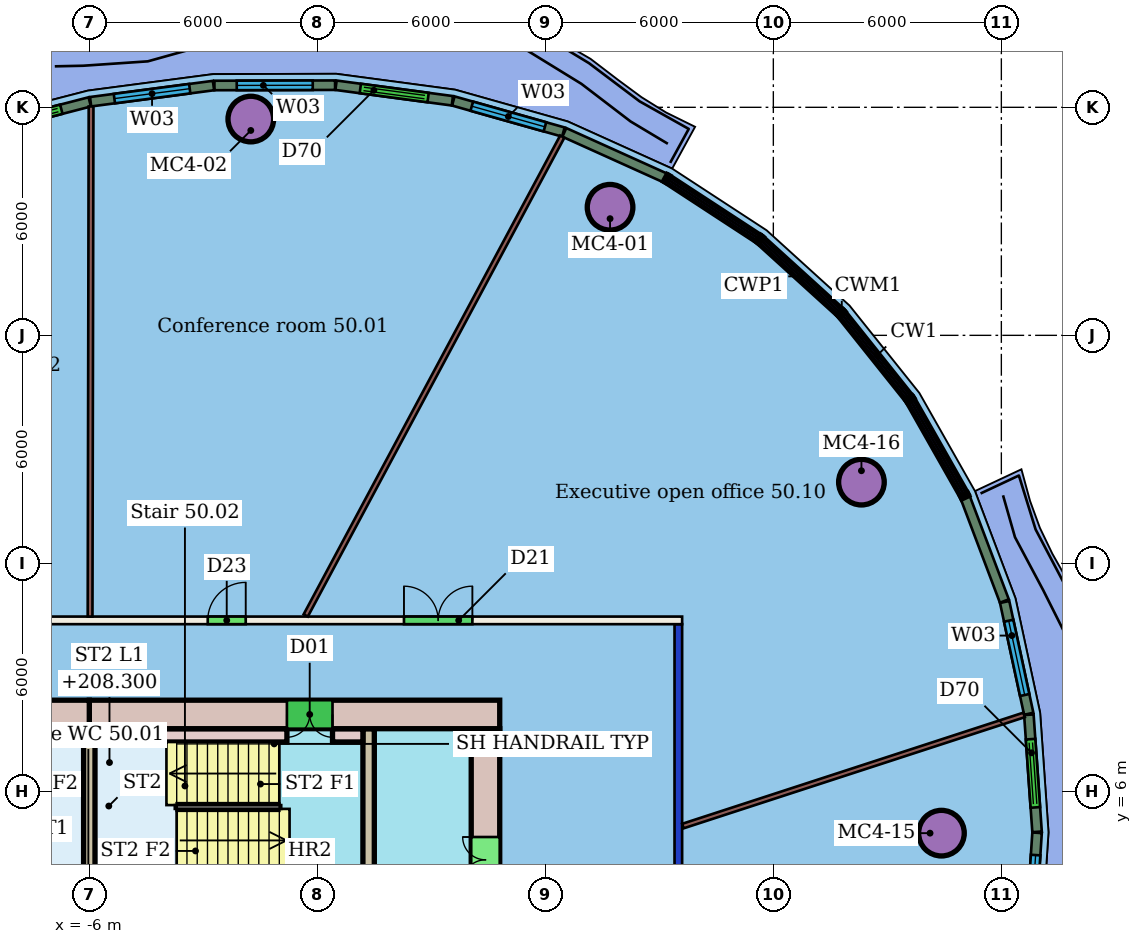
"""IFC4 building model, lengths in metres.
Left out: names, types, materials, properties, quantities, classifications, styles, units other than length and angle.
Written with IfcOpenShell. Run it as: python <this file> out.ifc"""

import sys

from ifc_helpers import new_model, si_unit, direction, frame, frame_2d, origin, origin_2d, place, context, subcontext, project, spatial, rectangle, hollow_circle, extrude, element, fill, save


model = new_model("IFC4")
c1 = context("Model", 3, precision=1e-05, world=origin(), true_north=direction((0.0, 1.0)))
c2 = subcontext(c1, "Body", "Model", "MODEL_VIEW")
j1 = project(units=[si_unit("LENGTHUNIT", "METRE"), si_unit("PLANEANGLEUNIT", "RADIAN")], contexts=[c1])
p1 = place(None, origin())
s1 = spatial("IfcSite", under=j1, at=p1, CompositionType="ELEMENT")
p2 = place(p1, origin())
s2 = spatial("IfcBuilding", under=s1, at=p2, CompositionType="ELEMENT")
p3 = place(p2, frame((0.0, 0.0, 206.5)))
s3 = spatial("IfcBuildingStorey", under=s2, at=p3, CompositionType="ELEMENT", Elevation=206.5)
for number, where, z_axis, x_axis in (
    (1, (7.704, 21.37, 0.0), (0.0, 0.0, 1.0), (1.0, 0.0, 0.0)),
    (2, (-1.75, 23.691, 0.0), (0.0, 0.0, 1.0), (1.0, 0.0, 0.0)),
    (3, (16.424, 4.901, 0.0), (0.0, 0.0, 1.0), (1.0, 0.0, 0.0)),
    (4, (14.318, 14.137, 0.0), (0.0, 0.0, 1.0), (1.0, 0.0, 0.0)),
):
    element("IfcColumn", number, at=place(p3, frame(where, z_axis=z_axis, x_axis=x_axis)), inside=s3, PredefinedType="COLUMN", context=c2, shape_type="SweptSolid", body=[
        extrude(hollow_circle(Radius=0.6, WallThickness=0.045, at=origin_2d()), origin(), (0.0, 0.0, 1.0), 3.45),
    ])
p4 = place(p3, frame((-21.6, 10.5, 0.0), z_axis=(0.0, 0.0, 1.0), x_axis=(1.0, 0.0, 0.0)))
e5 = element("IfcWall", 5, at=p4, inside=s3, PredefinedType="PARTITIONING", context=c2, shape_type="SweptSolid", body=[
    extrude(rectangle(XDim=31.2, YDim=0.2, at=frame_2d((15.6, 0.0))), origin(), (0.0, 0.0, 1.0), 3.45),
])
p5 = place(p4, frame((18.717, 0.0, 0.0)))
e6 = element("IfcOpeningElement", 6, at=p5, cuts=e5, PredefinedType="OPENING", context=c2, shape_type="SweptSolid", body=[
    extrude(rectangle(XDim=1.0, YDim=2.4, at=frame_2d((0.5, 1.2))), frame((0.0, 0.11, 0.0), z_axis=(0.0, -1.0, 0.0), x_axis=(1.0, 0.0, 0.0)), (0.0, 0.0, 1.0), 0.22),
])
p6 = place(p4, frame((12.014, 0.0, 0.0)))
e7 = element("IfcOpeningElement", 7, at=p6, cuts=e5, PredefinedType="OPENING", context=c2, shape_type="SweptSolid", body=[
    extrude(rectangle(XDim=1.0, YDim=2.4, at=frame_2d((0.5, 1.2))), frame((0.0, 0.11, 0.0), z_axis=(0.0, -1.0, 0.0), x_axis=(1.0, 0.0, 0.0)), (0.0, 0.0, 1.0), 0.22),
])
p7 = place(p4, frame((6.037, 0.0, 0.0)))
e8 = element("IfcOpeningElement", 8, at=p7, cuts=e5, PredefinedType="OPENING", context=c2, shape_type="SweptSolid", body=[
    extrude(rectangle(XDim=1.8, YDim=2.4, at=frame_2d((0.9, 1.2))), frame((0.0, 0.11, 0.0), z_axis=(0.0, -1.0, 0.0), x_axis=(1.0, 0.0, 0.0)), (0.0, 0.0, 1.0), 0.22),
])
p8 = place(p4, frame((23.88, 0.0, 0.0)))
e9 = element("IfcOpeningElement", 9, at=p8, cuts=e5, PredefinedType="OPENING", context=c2, shape_type="SweptSolid", body=[
    extrude(rectangle(XDim=1.8, YDim=2.1, at=frame_2d((0.9, 1.05))), frame((0.0, 0.11, 0.0), z_axis=(0.0, -1.0, 0.0), x_axis=(1.0, 0.0, 0.0)), (0.0, 0.0, 1.0), 0.22),
])
p9 = place(p3, frame((9.5, 10.4, 0.0), z_axis=(0.0, 0.0, 1.0), x_axis=(0.0, -1.0, 0.0)))
e10 = element("IfcWall", 10, at=p9, inside=s3, PredefinedType="PARTITIONING", context=c2, shape_type="SweptSolid", body=[
    extrude(rectangle(XDim=20.8, YDim=0.2, at=frame_2d((10.4, 0.0))), origin(), (0.0, 0.0, 1.0), 3.05),
])
p10 = place(p9, frame((8.246, 0.0, 0.0)))
e11 = element("IfcOpeningElement", 11, at=p10, cuts=e10, PredefinedType="OPENING", context=c2, shape_type="SweptSolid", body=[
    extrude(rectangle(XDim=1.5, YDim=2.1, at=frame_2d((0.75, 1.05))), frame((0.0, 0.11, 0.0), z_axis=(0.0, -1.0, 0.0), x_axis=(1.0, 0.0, 0.0)), (0.0, 0.0, 1.0), 0.22),
])
p11 = place(p3, frame((6.445, 23.228, 0.0), z_axis=(0.0, 0.0, 1.0), x_axis=(-0.472254118232, -0.881462448328, 0.0)))
e12 = element("IfcWall", 12, at=p11, inside=s3, PredefinedType="PARTITIONING", context=c2, shape_type="SweptSolid", body=[
    extrude(rectangle(XDim=14.293, YDim=0.125, at=frame_2d((7.146, 0.0))), origin(), (0.0, 0.0, 1.0), 3.45),
])
p12 = place(p3, frame((-5.953, 24.023, 0.0), z_axis=(0.0, 0.0, 1.0), x_axis=(-0.001946158555, -0.999998106232, 0.0)))
e13 = element("IfcWall", 13, at=p12, inside=s3, PredefinedType="PARTITIONING", context=c2, shape_type="SweptSolid", body=[
    extrude(rectangle(XDim=13.423, YDim=0.125, at=frame_2d((6.711, 0.0))), origin(), (0.0, 0.0, 1.0), 3.45),
])
p13 = place(p3, frame((18.599, 8.013, 0.0), z_axis=(0.0, 0.0, 1.0), x_axis=(-0.950829834715, -0.30971377983, 0.0)))
e14 = element("IfcWall", 14, at=p13, inside=s3, PredefinedType="PARTITIONING", context=c2, shape_type="SweptSolid", body=[
    extrude(rectangle(XDim=9.444, YDim=0.125, at=frame_2d((4.722, 0.0))), origin(), (0.0, 0.0, 1.0), 3.45),
])
p14 = place(p3, frame((9.144, 22.147, 0.0), z_axis=(0.0, 0.0, 1.0), x_axis=(-0.91141845893, 0.411480731897, 0.0)))
e15 = element("IfcWall", 15, at=p14, inside=s3, PredefinedType="SOLIDWALL", context=c2, shape_type="SweptSolid", body=[
    extrude(rectangle(XDim=2.901, YDim=0.25, at=frame_2d((1.45, 0.0))), origin(), (0.0, 0.0, 1.0), 3.1),
])
p15 = place(p3, frame((6.475, 23.349, 0.0), z_axis=(0.0, 0.0, 1.0), x_axis=(-0.962400743331, 0.271633593717, 0.0)))
e16 = element("IfcWall", 16, at=p15, inside=s3, PredefinedType="SOLIDWALL", context=c2, shape_type="SweptSolid", body=[
    extrude(rectangle(XDim=3.009, YDim=0.25, at=frame_2d((1.504, 0.0))), origin(), (0.0, 0.0, 1.0), 3.1),
])
p16 = place(p15, frame((0.504, 0.0, 0.9)))
e17 = element("IfcOpeningElement", 17, at=p16, cuts=e16, PredefinedType="OPENING", context=c2, shape_type="SweptSolid", body=[
    extrude(rectangle(XDim=2.0, YDim=2.1, at=frame_2d((1.0, 1.05))), frame((0.0, 0.135, 0.0), z_axis=(0.0, -1.0, 0.0), x_axis=(1.0, 0.0, 0.0)), (0.0, 0.0, 1.0), 0.27),
])
p17 = place(p3, frame((3.554, 24.172, 0.0), z_axis=(0.0, 0.0, 1.0), x_axis=(-0.99120717839, 0.132319044388, 0.0)))
e18 = element("IfcWall", 18, at=p17, inside=s3, PredefinedType="SOLIDWALL", context=c2, shape_type="SweptSolid", body=[
    extrude(rectangle(XDim=3.089, YDim=0.25, at=frame_2d((1.544, 0.0))), origin(), (0.0, 0.0, 1.0), 3.1),
])
p18 = place(p17, frame((0.644, 0.0, 0.0)))
e19 = element("IfcOpeningElement", 19, at=p18, cuts=e18, PredefinedType="OPENING", context=c2, shape_type="SweptSolid", body=[
    extrude(rectangle(XDim=1.8, YDim=2.4, at=frame_2d((0.9, 1.2))), frame((0.0, 0.135, 0.0), z_axis=(0.0, -1.0, 0.0), x_axis=(1.0, 0.0, 0.0)), (0.0, 0.0, 1.0), 0.27),
])
p19 = place(p3, frame((0.468, 24.582, 0.0), z_axis=(0.0, 0.0, 1.0), x_axis=(-0.999996972757, -0.002460584631, 0.0)))
e20 = element("IfcWall", 20, at=p19, inside=s3, PredefinedType="SOLIDWALL", context=c2, shape_type="SweptSolid", body=[
    extrude(rectangle(XDim=3.175, YDim=0.25, at=frame_2d((1.587, 0.0))), origin(), (0.0, 0.0, 1.0), 3.1),
])
p20 = place(p19, frame((0.588, 0.0, 0.9)))
e21 = element("IfcOpeningElement", 21, at=p20, cuts=e20, PredefinedType="OPENING", context=c2, shape_type="SweptSolid", body=[
    extrude(rectangle(XDim=2.0, YDim=2.1, at=frame_2d((1.0, 1.05))), frame((0.0, 0.135, 0.0), z_axis=(0.0, -1.0, 0.0), x_axis=(1.0, 0.0, 0.0)), (0.0, 0.0, 1.0), 0.27),
])
p21 = place(p3, frame((-2.731, 24.573, 0.0), z_axis=(0.0, 0.0, 1.0), x_axis=(-0.991444867529, -0.130526145465, 0.0)))
e22 = element("IfcWall", 22, at=p21, inside=s3, PredefinedType="SOLIDWALL", context=c2, shape_type="SweptSolid", body=[
    extrude(rectangle(XDim=3.262, YDim=0.25, at=frame_2d((1.631, 0.0))), origin(), (0.0, 0.0, 1.0), 3.1),
])
p22 = place(p21, frame((0.631, 0.0, 0.9)))
e23 = element("IfcOpeningElement", 23, at=p22, cuts=e22, PredefinedType="OPENING", context=c2, shape_type="SweptSolid", body=[
    extrude(rectangle(XDim=2.0, YDim=2.1, at=frame_2d((1.0, 1.05))), frame((0.0, 0.135, 0.0), z_axis=(0.0, -1.0, 0.0), x_axis=(1.0, 0.0, 0.0)), (0.0, 0.0, 1.0), 0.27),
])
p23 = place(p3, frame((-5.989, 24.143, 0.0), z_axis=(0.0, 0.0, 1.0), x_axis=(-0.968152404137, -0.250361583242, 0.0)))
e24 = element("IfcWall", 24, at=p23, inside=s3, PredefinedType="SOLIDWALL", context=c2, shape_type="SweptSolid", body=[
    extrude(rectangle(XDim=3.344, YDim=0.25, at=frame_2d((1.672, 0.0))), origin(), (0.0, 0.0, 1.0), 3.1),
])
p24 = place(p23, frame((0.772, 0.0, 0.0)))
e25 = element("IfcOpeningElement", 25, at=p24, cuts=e24, PredefinedType="OPENING", context=c2, shape_type="SweptSolid", body=[
    extrude(rectangle(XDim=1.8, YDim=2.4, at=frame_2d((0.9, 1.2))), frame((0.0, 0.135, 0.0), z_axis=(0.0, -1.0, 0.0), x_axis=(1.0, 0.0, 0.0)), (0.0, 0.0, 1.0), 0.27),
])
p25 = place(p3, frame((18.733, 1.743, 0.0), z_axis=(0.0, 0.0, 1.0), x_axis=(0.065278866851, 0.997867060055, 0.0)))
e26 = element("IfcWall", 26, at=p25, inside=s3, PredefinedType="SOLIDWALL", context=c2, shape_type="SweptSolid", body=[
    extrude(rectangle(XDim=3.175, YDim=0.25, at=frame_2d((1.588, 0.0))), origin(), (0.0, 0.0, 1.0), 3.1),
])
p26 = place(p25, frame((0.588, 0.0, 0.9)))
e27 = element("IfcOpeningElement", 27, at=p26, cuts=e26, PredefinedType="OPENING", context=c2, shape_type="SweptSolid", body=[
    extrude(rectangle(XDim=2.0, YDim=2.1, at=frame_2d((1.0, 1.05))), frame((0.0, 0.135, 0.0), z_axis=(0.0, -1.0, 0.0), x_axis=(1.0, 0.0, 0.0)), (0.0, 0.0, 1.0), 0.27),
])
p27 = place(p3, frame((18.94, 4.936, 0.0), z_axis=(0.0, 0.0, 1.0), x_axis=(-0.06987632373, 0.997555662298, 0.0)))
e28 = element("IfcWall", 28, at=p27, inside=s3, PredefinedType="SOLIDWALL", context=c2, shape_type="SweptSolid", body=[
    extrude(rectangle(XDim=3.089, YDim=0.25, at=frame_2d((1.544, 0.0))), origin(), (0.0, 0.0, 1.0), 3.1),
])
p28 = place(p27, frame((0.644, 0.0, 0.0)))
e29 = element("IfcOpeningElement", 29, at=p28, cuts=e28, PredefinedType="OPENING", context=c2, shape_type="SweptSolid", body=[
    extrude(rectangle(XDim=1.8, YDim=2.4, at=frame_2d((0.9, 1.2))), frame((0.0, 0.135, 0.0), z_axis=(0.0, -1.0, 0.0), x_axis=(1.0, 0.0, 0.0)), (0.0, 0.0, 1.0), 0.27),
])
p29 = place(p3, frame((18.72, 8.043, 0.0), z_axis=(0.0, 0.0, 1.0), x_axis=(-0.210637196003, 0.977564305639, 0.0)))
e30 = element("IfcWall", 30, at=p29, inside=s3, PredefinedType="SOLIDWALL", context=c2, shape_type="SweptSolid", body=[
    extrude(rectangle(XDim=3.009, YDim=0.25, at=frame_2d((1.504, 0.0))), origin(), (0.0, 0.0, 1.0), 3.1),
])
p30 = place(p29, frame((0.504, 0.0, 0.9)))
e31 = element("IfcOpeningElement", 31, at=p30, cuts=e30, PredefinedType="OPENING", context=c2, shape_type="SweptSolid", body=[
    extrude(rectangle(XDim=2.0, YDim=2.1, at=frame_2d((1.0, 1.05))), frame((0.0, 0.135, 0.0), z_axis=(0.0, -1.0, 0.0), x_axis=(1.0, 0.0, 0.0)), (0.0, 0.0, 1.0), 0.27),
])
p31 = place(p3, frame((18.079, 11.01, 0.0), z_axis=(0.0, 0.0, 1.0), x_axis=(-0.353400568719, 0.935472093667, 0.0)))
e32 = element("IfcWall", 32, at=p31, inside=s3, PredefinedType="SOLIDWALL", context=c2, shape_type="SweptSolid", body=[
    extrude(rectangle(XDim=2.901, YDim=0.25, at=frame_2d((1.45, 0.0))), origin(), (0.0, 0.0, 1.0), 3.1),
])
p32 = place(p3, frame((4.8, 8.025, 0.0), z_axis=(0.0, 0.0, 1.0), x_axis=(-1.0, 0.0, 0.0)))
e33 = element("IfcWall", 33, at=p32, inside=s3, PredefinedType="SHEAR", context=c2, shape_type="SweptSolid", body=[
    extrude(rectangle(XDim=10.8, YDim=0.75, at=frame_2d((5.4, 0.0))), origin(), (0.0, 0.0, 1.0), 3.3),
])
p33 = place(p32, frame((4.4, 0.0, 0.0)))
e34 = element("IfcOpeningElement", 34, at=p33, cuts=e33, PredefinedType="OPENING", context=c2, shape_type="SweptSolid", body=[
    extrude(rectangle(XDim=1.2, YDim=2.1, at=frame_2d((0.6, 1.05))), frame((0.0, 0.385, 0.0), z_axis=(0.0, -1.0, 0.0), x_axis=(1.0, 0.0, 0.0)), (0.0, 0.0, 1.0), 0.77),
])
p34 = place(p3, frame((-6.0, 8.025, 0.0), z_axis=(0.0, 0.0, 1.0), x_axis=(-1.0, 0.0, 0.0)))
e35 = element("IfcWall", 35, at=p34, inside=s3, PredefinedType="SHEAR", context=c2, shape_type="SweptSolid", body=[
    extrude(rectangle(XDim=10.8, YDim=0.75, at=frame_2d((5.4, 0.0))), origin(), (0.0, 0.0, 1.0), 3.3),
])
p35 = place(p34, frame((5.2, 0.0, 0.0)))
e36 = element("IfcOpeningElement", 36, at=p35, cuts=e35, PredefinedType="OPENING", context=c2, shape_type="SweptSolid", body=[
    extrude(rectangle(XDim=1.2, YDim=2.1, at=frame_2d((0.6, 1.05))), frame((0.0, 0.385, 0.0), z_axis=(0.0, -1.0, 0.0), x_axis=(1.0, 0.0, 0.0)), (0.0, 0.0, 1.0), 0.77),
])
p36 = place(p3, frame((4.425, -7.65, 0.0), z_axis=(0.0, 0.0, 1.0), x_axis=(0.0, 1.0, 0.0)))
e37 = element("IfcWall", 37, at=p36, inside=s3, PredefinedType="SHEAR", context=c2, shape_type="SweptSolid", body=[
    extrude(rectangle(XDim=15.3, YDim=0.75, at=frame_2d((7.65, 0.0))), origin(), (0.0, 0.0, 1.0), 3.3),
])
p37 = place(p36, frame((2.85, 0.0, 0.0)))
e38 = element("IfcOpeningElement", 38, at=p37, cuts=e37, PredefinedType="OPENING", context=c2, shape_type="SweptSolid", body=[
    extrude(rectangle(XDim=1.2, YDim=2.1, at=frame_2d((0.6, 1.05))), frame((0.0, 0.385, 0.0), z_axis=(0.0, -1.0, 0.0), x_axis=(1.0, 0.0, 0.0)), (0.0, 0.0, 1.0), 0.77),
])
p38 = place(p36, frame((11.25, 0.0, 0.0)))
e39 = element("IfcOpeningElement", 39, at=p38, cuts=e37, PredefinedType="OPENING", context=c2, shape_type="SweptSolid", body=[
    extrude(rectangle(XDim=1.2, YDim=2.1, at=frame_2d((0.6, 1.05))), frame((0.0, 0.385, 0.0), z_axis=(0.0, -1.0, 0.0), x_axis=(1.0, 0.0, 0.0)), (0.0, 0.0, 1.0), 0.77),
])
p39 = place(p3, frame((1.35, -7.65, 0.0), z_axis=(0.0, 0.0, 1.0), x_axis=(0.0, 1.0, 0.0)))
e40 = element("IfcWall", 40, at=p39, inside=s3, PredefinedType="SHEAR", context=c2, shape_type="SweptSolid", body=[
    extrude(rectangle(XDim=15.3, YDim=0.3, at=frame_2d((7.65, 0.0))), origin(), (0.0, 0.0, 1.0), 3.3),
])
p40 = place(p39, frame((1.56, 0.0, 0.0)))
e41 = element("IfcOpeningElement", 41, at=p40, cuts=e40, PredefinedType="OPENING", context=c2, shape_type="SweptSolid", body=[
    extrude(rectangle(XDim=1.0, YDim=2.1, at=frame_2d((0.5, 1.05))), frame((0.0, 0.16, 0.0), z_axis=(0.0, -1.0, 0.0), x_axis=(1.0, 0.0, 0.0)), (0.0, 0.0, 1.0), 0.32),
])
p41 = place(p39, frame((6.9, 0.0, 0.0)))
e42 = element("IfcOpeningElement", 42, at=p41, cuts=e40, PredefinedType="OPENING", context=c2, shape_type="SweptSolid", body=[
    extrude(rectangle(XDim=1.5, YDim=2.1, at=frame_2d((0.75, 1.05))), frame((0.0, 0.16, 0.0), z_axis=(0.0, -1.0, 0.0), x_axis=(1.0, 0.0, 0.0)), (0.0, 0.0, 1.0), 0.32),
])
p42 = place(p3, frame((-6.0, 3.88, 0.0), z_axis=(0.0, 0.0, 1.0), x_axis=(0.0, 1.0, 0.0)))
e43 = element("IfcWall", 43, at=p42, inside=s3, PredefinedType="SHEAR", context=c2, shape_type="SweptSolid", body=[
    extrude(rectangle(XDim=3.77, YDim=0.3, at=frame_2d((1.885, 0.0))), origin(), (0.0, 0.0, 1.0), 3.3),
])
for number, where, z_axis, x_axis in (
    (44, (-11.2, 7.475, 0.0), (0.0, 0.0, 1.0), (1.0, 0.0, 0.0)),
    (45, (-5.85, 7.475, 0.0), (0.0, 0.0, 1.0), (1.0, 0.0, 0.0)),
):
    element("IfcWall", number, at=place(p3, frame(where, z_axis=z_axis, x_axis=x_axis)), inside=s3, PredefinedType="SHEAR", context=c2, shape_type="SweptSolid", body=[
        extrude(rectangle(XDim=5.05, YDim=0.35, at=frame_2d((2.525, 0.0))), origin(), (0.0, 0.0, 1.0), 3.3),
    ])
p43 = place(p3, frame((0.4, 7.475, 0.0), z_axis=(0.0, 0.0, 1.0), x_axis=(1.0, 0.0, 0.0)))
e46 = element("IfcWall", 46, at=p43, inside=s3, PredefinedType="SHEAR", context=c2, shape_type="SweptSolid", body=[
    extrude(rectangle(XDim=0.8, YDim=0.35, at=frame_2d((0.4, 0.0))), origin(), (0.0, 0.0, 1.0), 3.3),
])
p44 = place(p5, origin())
e47 = element("IfcDoor", 47, at=p44, inside=s3, OperationType="SINGLE_SWING_RIGHT", PredefinedType="DOOR", context=c2, shape_type="SweptSolid", body=[
    extrude(rectangle(XDim=1.0, YDim=2.4, at=frame_2d((0.5, 1.2))), frame((0.0, 0.025, 0.0), z_axis=(0.0, -1.0, 0.0), x_axis=(1.0, 0.0, 0.0)), (0.0, 0.0, 1.0), 0.05),
])
fill(e6, e47)
p45 = place(p8, origin())
e48 = element("IfcDoor", 48, at=p45, inside=s3, OperationType="DOUBLE_DOOR_SINGLE_SWING", PredefinedType="DOOR", context=c2, shape_type="SweptSolid", body=[
    extrude(rectangle(XDim=1.8, YDim=2.1, at=frame_2d((0.9, 1.05))), frame((0.0, 0.025, 0.0), z_axis=(0.0, -1.0, 0.0), x_axis=(1.0, 0.0, 0.0)), (0.0, 0.0, 1.0), 0.05),
])
fill(e9, e48)
p46 = place(p16, origin())
e49 = element("IfcWindow", 49, at=p46, inside=s3, PartitioningType="SINGLE_PANEL", PredefinedType="WINDOW", context=c2, shape_type="SweptSolid", body=[
    extrude(rectangle(XDim=2.0, YDim=2.1, at=frame_2d((1.0, 1.05))), frame((0.0, 0.03, 0.0), z_axis=(0.0, -1.0, 0.0), x_axis=(1.0, 0.0, 0.0)), (0.0, 0.0, 1.0), 0.06),
])
fill(e17, e49)
p47 = place(p18, origin())
e50 = element("IfcDoor", 50, at=p47, inside=s3, OperationType="DOUBLE_DOOR_SLIDING", PredefinedType="DOOR", context=c2, shape_type="SweptSolid", body=[
    extrude(rectangle(XDim=1.8, YDim=2.4, at=frame_2d((0.9, 1.2))), frame((0.0, 0.025, 0.0), z_axis=(0.0, -1.0, 0.0), x_axis=(1.0, 0.0, 0.0)), (0.0, 0.0, 1.0), 0.05),
])
fill(e19, e50)
p48 = place(p20, origin())
e51 = element("IfcWindow", 51, at=p48, inside=s3, PartitioningType="SINGLE_PANEL", PredefinedType="WINDOW", context=c2, shape_type="SweptSolid", body=[
    extrude(rectangle(XDim=2.0, YDim=2.1, at=frame_2d((1.0, 1.05))), frame((0.0, 0.03, 0.0), z_axis=(0.0, -1.0, 0.0), x_axis=(1.0, 0.0, 0.0)), (0.0, 0.0, 1.0), 0.06),
])
fill(e21, e51)
p49 = place(p22, origin())
e52 = element("IfcWindow", 52, at=p49, inside=s3, PartitioningType="SINGLE_PANEL", PredefinedType="WINDOW", context=c2, shape_type="SweptSolid", body=[
    extrude(rectangle(XDim=2.0, YDim=2.1, at=frame_2d((1.0, 1.05))), frame((0.0, 0.03, 0.0), z_axis=(0.0, -1.0, 0.0), x_axis=(1.0, 0.0, 0.0)), (0.0, 0.0, 1.0), 0.06),
])
fill(e23, e52)
p50 = place(p24, origin())
e53 = element("IfcDoor", 53, at=p50, inside=s3, OperationType="DOUBLE_DOOR_SLIDING", PredefinedType="DOOR", context=c2, shape_type="SweptSolid", body=[
    extrude(rectangle(XDim=1.8, YDim=2.4, at=frame_2d((0.9, 1.2))), frame((0.0, 0.025, 0.0), z_axis=(0.0, -1.0, 0.0), x_axis=(1.0, 0.0, 0.0)), (0.0, 0.0, 1.0), 0.05),
])
fill(e25, e53)
p51 = place(p26, origin())
e54 = element("IfcWindow", 54, at=p51, inside=s3, PartitioningType="SINGLE_PANEL", PredefinedType="WINDOW", context=c2, shape_type="SweptSolid", body=[
    extrude(rectangle(XDim=2.0, YDim=2.1, at=frame_2d((1.0, 1.05))), frame((0.0, 0.03, 0.0), z_axis=(0.0, -1.0, 0.0), x_axis=(1.0, 0.0, 0.0)), (0.0, 0.0, 1.0), 0.06),
])
fill(e27, e54)
p52 = place(p28, origin())
e55 = element("IfcDoor", 55, at=p52, inside=s3, OperationType="DOUBLE_DOOR_SLIDING", PredefinedType="DOOR", context=c2, shape_type="SweptSolid", body=[
    extrude(rectangle(XDim=1.8, YDim=2.4, at=frame_2d((0.9, 1.2))), frame((0.0, 0.025, 0.0), z_axis=(0.0, -1.0, 0.0), x_axis=(1.0, 0.0, 0.0)), (0.0, 0.0, 1.0), 0.05),
])
fill(e29, e55)
p53 = place(p30, origin())
e56 = element("IfcWindow", 56, at=p53, inside=s3, PartitioningType="SINGLE_PANEL", PredefinedType="WINDOW", context=c2, shape_type="SweptSolid", body=[
    extrude(rectangle(XDim=2.0, YDim=2.1, at=frame_2d((1.0, 1.05))), frame((0.0, 0.03, 0.0), z_axis=(0.0, -1.0, 0.0), x_axis=(1.0, 0.0, 0.0)), (0.0, 0.0, 1.0), 0.06),
])
fill(e31, e56)
p54 = place(p33, origin())
e57 = element("IfcDoor", 57, at=p54, inside=s3, OperationType="DOUBLE_DOOR_SINGLE_SWING", PredefinedType="NOTDEFINED", context=c2, shape_type="SweptSolid", body=[
    extrude(rectangle(XDim=1.2, YDim=2.1, at=frame_2d((0.6, 1.05))), frame((0.0, 0.025, 0.0), z_axis=(0.0, -1.0, 0.0), x_axis=(1.0, 0.0, 0.0)), (0.0, 0.0, 1.0), 0.05),
])
fill(e34, e57)
p55 = place(p38, origin())
e58 = element("IfcDoor", 58, at=p55, inside=s3, OperationType="DOUBLE_DOOR_SINGLE_SWING", PredefinedType="NOTDEFINED", context=c2, shape_type="SweptSolid", body=[
    extrude(rectangle(XDim=1.2, YDim=2.1, at=frame_2d((0.6, 1.05))), frame((0.0, 0.025, 0.0), z_axis=(0.0, -1.0, 0.0), x_axis=(1.0, 0.0, 0.0)), (0.0, 0.0, 1.0), 0.05),
])
fill(e39, e58)
save(model, sys.argv[1])
